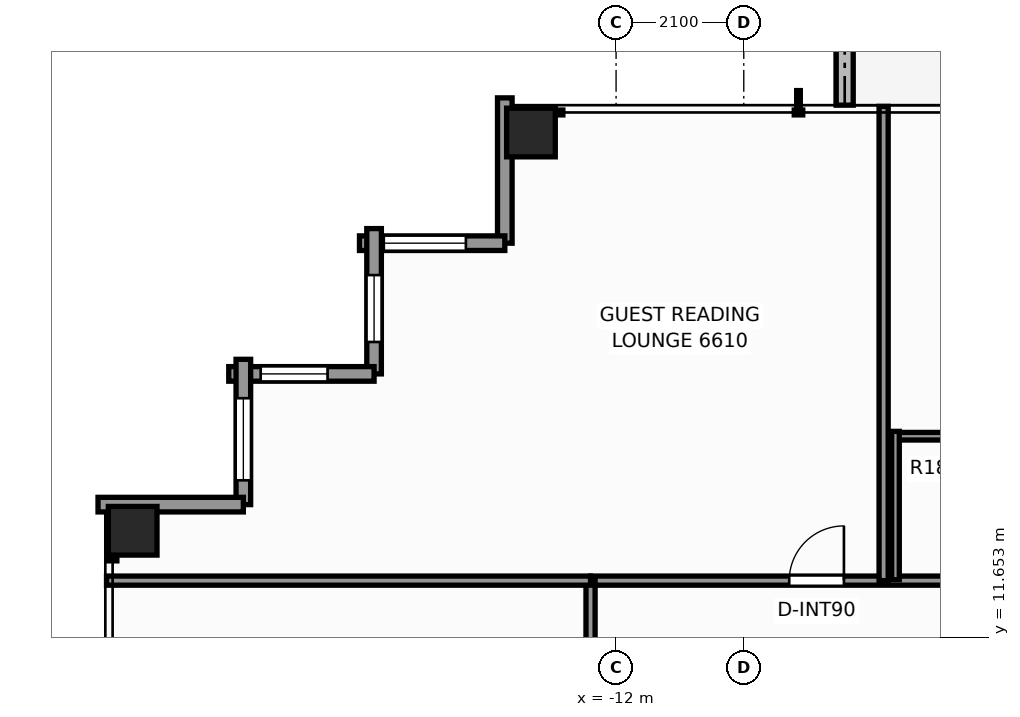
"""IFC4 building model, lengths in metres.
Left out: names, types, materials, properties, quantities, classifications, styles, units other than length and angle.
Written with IfcOpenShell. Run it as: python <this file> out.ifc"""

import sys

from ifc_helpers import new_model, si_unit, direction, frame, frame_2d, origin, origin_2d, place, context, subcontext, project, spatial, rectangle, extrude, element, fill, save


model = new_model("IFC4")
c1 = context("Model", 3, precision=1e-05, world=origin(), true_north=direction((0.0, 1.0)))
c2 = subcontext(c1, "Body", "Model", "MODEL_VIEW")
j1 = project(units=[si_unit("LENGTHUNIT", "METRE"), si_unit("PLANEANGLEUNIT", "RADIAN")], contexts=[c1])
p1 = place(None, origin())
s1 = spatial("IfcSite", under=j1, at=p1, CompositionType="ELEMENT")
p2 = place(p1, origin())
s2 = spatial("IfcBuilding", under=s1, at=p2, CompositionType="ELEMENT")
p3 = place(p2, frame((0.0, 0.0, 226.2)))
s3 = spatial("IfcBuildingStorey", under=s2, at=p3, CompositionType="ELEMENT", Elevation=226.2)
for number, where, z_axis, x_axis in (
    (1, (-13.4, 19.95, 0.0), (0.0, 0.0, 1.0), (1.0, 0.0, 0.0)),
    (2, (-19.95, 13.4, 0.0), (0.0, 0.0, 1.0), (1.0, 0.0, 0.0)),
):
    element("IfcColumn", number, at=place(p3, frame(where, z_axis=z_axis, x_axis=x_axis)), inside=s3, PredefinedType="COLUMN", context=c2, shape_type="SweptSolid", body=[
        extrude(rectangle(XDim=0.8, YDim=0.8, at=origin_2d()), origin(), (0.0, 0.0, 1.0), 3.3),
    ])
p4 = place(p3, frame((-8.24, 23.767, -0.04), z_axis=(0.0, 0.0, 1.0), x_axis=(0.0, -1.0, 0.0)))
e3 = element("IfcWall", 3, at=p4, inside=s3, PredefinedType="PARAPET", context=c2, shape_type="SweptSolid", body=[
    extrude(rectangle(XDim=3.367, YDim=0.28, at=frame_2d((1.684, 0.0))), origin(), (0.0, 0.0, 1.0), 0.42),
])
p5 = place(p3, frame((-13.83, 18.13, 0.0), z_axis=(0.0, 0.0, 1.0), x_axis=(0.0, 1.0, 0.0)))
e4 = element("IfcWall", 4, at=p5, inside=s3, PredefinedType="STANDARD", context=c2, shape_type="SweptSolid", body=[
    extrude(rectangle(XDim=2.39, YDim=0.24, at=frame_2d((1.195, 0.0))), origin(), (0.0, 0.0, 1.0), 2.463),
])
p6 = place(p3, frame((-16.22, 18.13, 0.0), z_axis=(0.0, 0.0, 1.0), x_axis=(1.0, 0.0, 0.0)))
e5 = element("IfcWall", 5, at=p6, inside=s3, PredefinedType="STANDARD", context=c2, shape_type="SweptSolid", body=[
    extrude(rectangle(XDim=2.39, YDim=0.24, at=frame_2d((1.195, 0.0))), origin(), (0.0, 0.0, 1.0), 2.463),
])
p7 = place(p6, frame((0.4, 0.0, 0.65)))
e6 = element("IfcOpeningElement", 6, at=p7, cuts=e5, PredefinedType="OPENING", context=c2, shape_type="SweptSolid", body=[
    extrude(rectangle(XDim=1.35, YDim=1.55, at=frame_2d((0.675, 0.775))), frame((0.0, 0.13, 0.0), z_axis=(0.0, -1.0, 0.0), x_axis=(1.0, 0.0, 0.0)), (0.0, 0.0, 1.0), 0.26),
])
p8 = place(p3, frame((-15.98, 15.98, 0.0), z_axis=(0.0, 0.0, 1.0), x_axis=(0.0, 1.0, 0.0)))
e7 = element("IfcWall", 7, at=p8, inside=s3, PredefinedType="STANDARD", context=c2, shape_type="SweptSolid", body=[
    extrude(rectangle(XDim=2.39, YDim=0.24, at=frame_2d((1.195, 0.0))), origin(), (0.0, 0.0, 1.0), 2.463),
])
p9 = place(p8, frame((0.525, 0.0, 0.65)))
e8 = element("IfcOpeningElement", 8, at=p9, cuts=e7, PredefinedType="OPENING", context=c2, shape_type="SweptSolid", body=[
    extrude(rectangle(XDim=1.1, YDim=1.45, at=frame_2d((0.55, 0.725))), frame((0.0, 0.13, 0.0), z_axis=(0.0, -1.0, 0.0), x_axis=(1.0, 0.0, 0.0)), (0.0, 0.0, 1.0), 0.26),
])
p10 = place(p3, frame((-18.37, 15.98, 0.0), z_axis=(0.0, 0.0, 1.0), x_axis=(1.0, 0.0, 0.0)))
e9 = element("IfcWall", 9, at=p10, inside=s3, PredefinedType="STANDARD", context=c2, shape_type="SweptSolid", body=[
    extrude(rectangle(XDim=2.39, YDim=0.24, at=frame_2d((1.195, 0.0))), origin(), (0.0, 0.0, 1.0), 2.463),
])
p11 = place(p10, frame((0.525, 0.0, 0.65)))
e10 = element("IfcOpeningElement", 10, at=p11, cuts=e9, PredefinedType="OPENING", context=c2, shape_type="SweptSolid", body=[
    extrude(rectangle(XDim=1.1, YDim=1.45, at=frame_2d((0.55, 0.725))), frame((0.0, 0.13, 0.0), z_axis=(0.0, -1.0, 0.0), x_axis=(1.0, 0.0, 0.0)), (0.0, 0.0, 1.0), 0.26),
])
p12 = place(p3, frame((-18.13, 13.83, 0.0), z_axis=(0.0, 0.0, 1.0), x_axis=(0.0, 1.0, 0.0)))
e11 = element("IfcWall", 11, at=p12, inside=s3, PredefinedType="STANDARD", context=c2, shape_type="SweptSolid", body=[
    extrude(rectangle(XDim=2.39, YDim=0.24, at=frame_2d((1.195, 0.0))), origin(), (0.0, 0.0, 1.0), 2.463),
])
p13 = place(p12, frame((0.4, 0.0, 0.65)))
e12 = element("IfcOpeningElement", 12, at=p13, cuts=e11, PredefinedType="OPENING", context=c2, shape_type="SweptSolid", body=[
    extrude(rectangle(XDim=1.35, YDim=1.55, at=frame_2d((0.675, 0.775))), frame((0.0, 0.13, 0.0), z_axis=(0.0, -1.0, 0.0), x_axis=(1.0, 0.0, 0.0)), (0.0, 0.0, 1.0), 0.26),
])
p14 = place(p3, frame((-20.52, 13.83, 0.0), z_axis=(0.0, 0.0, 1.0), x_axis=(1.0, 0.0, 0.0)))
e13 = element("IfcWall", 13, at=p14, inside=s3, PredefinedType="STANDARD", context=c2, shape_type="SweptSolid", body=[
    extrude(rectangle(XDim=2.39, YDim=0.24, at=frame_2d((1.195, 0.0))), origin(), (0.0, 0.0, 1.0), 2.463),
])
p15 = place(p3, frame((-12.42, 12.58, 0.0), z_axis=(0.0, 0.0, 1.0), x_axis=(1.0, 0.0, 0.0)))
e14 = element("IfcWall", 14, at=p15, inside=s3, PredefinedType="PARTITIONING", context=c2, shape_type="SweptSolid", body=[
    extrude(rectangle(XDim=24.68, YDim=0.15, at=frame_2d((12.34, 0.0))), origin(), (0.0, 0.0, 1.0), 2.369),
])
p16 = place(p15, frame((3.267, 0.0, 0.0)))
e15 = element("IfcOpeningElement", 15, at=p16, cuts=e14, PredefinedType="OPENING", context=c2, shape_type="SweptSolid", body=[
    extrude(rectangle(XDim=0.9, YDim=2.06, at=frame_2d((0.45, 1.03))), frame((0.0, 0.085, 0.0), z_axis=(0.0, -1.0, 0.0), x_axis=(1.0, 0.0, 0.0)), (0.0, 0.0, 1.0), 0.17),
])
p17 = place(p15, frame((9.915, 0.0, 0.0)))
e16 = element("IfcOpeningElement", 16, at=p17, cuts=e14, PredefinedType="OPENING", context=c2, shape_type="SweptSolid", body=[
    extrude(rectangle(XDim=0.95, YDim=2.06, at=frame_2d((0.475, 1.03))), frame((0.0, 0.085, 0.0), z_axis=(0.0, -1.0, 0.0), x_axis=(1.0, 0.0, 0.0)), (0.0, 0.0, 1.0), 0.17),
])
p18 = place(p15, frame((18.587, 0.0, 0.0)))
e17 = element("IfcOpeningElement", 17, at=p18, cuts=e14, PredefinedType="OPENING", context=c2, shape_type="SweptSolid", body=[
    extrude(rectangle(XDim=0.95, YDim=2.06, at=frame_2d((0.475, 1.03))), frame((0.0, 0.085, 0.0), z_axis=(0.0, -1.0, 0.0), x_axis=(1.0, 0.0, 0.0)), (0.0, 0.0, 1.0), 0.17),
])
p19 = place(p15, frame((20.85, 0.0, 0.0)))
e18 = element("IfcOpeningElement", 18, at=p19, cuts=e14, PredefinedType="OPENING", context=c2, shape_type="SweptSolid", body=[
    extrude(rectangle(XDim=0.9, YDim=2.06, at=frame_2d((0.45, 1.03))), frame((0.0, 0.085, 0.0), z_axis=(0.0, -1.0, 0.0), x_axis=(1.0, 0.0, 0.0)), (0.0, 0.0, 1.0), 0.17),
])
p20 = place(p3, frame((-12.42, -12.26, 0.0), z_axis=(0.0, 0.0, 1.0), x_axis=(0.0, 1.0, 0.0)))
e19 = element("IfcWall", 19, at=p20, inside=s3, PredefinedType="PARTITIONING", context=c2, shape_type="SweptSolid", body=[
    extrude(rectangle(XDim=24.84, YDim=0.15, at=frame_2d((12.42, 0.0))), origin(), (0.0, 0.0, 1.0), 2.369),
])
p21 = place(p20, frame((3.84, 0.0, 0.0)))
e20 = element("IfcOpeningElement", 20, at=p21, cuts=e19, PredefinedType="OPENING", context=c2, shape_type="SweptSolid", body=[
    extrude(rectangle(XDim=0.95, YDim=2.06, at=frame_2d((0.475, 1.03))), frame((0.0, 0.085, 0.0), z_axis=(0.0, -1.0, 0.0), x_axis=(1.0, 0.0, 0.0)), (0.0, 0.0, 1.0), 0.17),
])
p22 = place(p20, frame((9.738, 0.0, 0.0)))
e21 = element("IfcOpeningElement", 21, at=p22, cuts=e19, PredefinedType="OPENING", context=c2, shape_type="SweptSolid", body=[
    extrude(rectangle(XDim=0.95, YDim=2.06, at=frame_2d((0.475, 1.03))), frame((0.0, 0.085, 0.0), z_axis=(0.0, -1.0, 0.0), x_axis=(1.0, 0.0, 0.0)), (0.0, 0.0, 1.0), 0.17),
])
p23 = place(p20, frame((19.32, 0.0, 0.0)))
e22 = element("IfcOpeningElement", 22, at=p23, cuts=e19, PredefinedType="OPENING", context=c2, shape_type="SweptSolid", body=[
    extrude(rectangle(XDim=0.95, YDim=2.06, at=frame_2d((0.475, 1.03))), frame((0.0, 0.085, 0.0), z_axis=(0.0, -1.0, 0.0), x_axis=(1.0, 0.0, 0.0)), (0.0, 0.0, 1.0), 0.17),
])
p24 = place(p3, frame((-20.38, 12.58, 0.0), z_axis=(0.0, 0.0, 1.0), x_axis=(1.0, 0.0, 0.0)))
e23 = element("IfcWall", 23, at=p24, inside=s3, PredefinedType="PARTITIONING", context=c2, shape_type="SweptSolid", body=[
    extrude(rectangle(XDim=7.96, YDim=0.15, at=frame_2d((3.98, 0.0))), origin(), (0.0, 0.0, 1.0), 2.369),
])
p25 = place(p3, frame((-7.6, 12.58, 0.0), z_axis=(0.0, 0.0, 1.0), x_axis=(0.0, 1.0, 0.0)))
e24 = element("IfcWall", 24, at=p25, inside=s3, PredefinedType="PARTITIONING", context=c2, shape_type="SweptSolid", body=[
    extrude(rectangle(XDim=7.8, YDim=0.15, at=frame_2d((3.9, 0.0))), origin(), (0.0, 0.0, 1.0), 2.453),
])
p26 = place(p3, frame((-7.465, 14.955, 0.0), z_axis=(0.0, 0.0, 1.0), x_axis=(1.0, 0.0, 0.0)))
e25 = element("IfcWall", 25, at=p26, inside=s3, PredefinedType="PARTITIONING", context=c2, shape_type="SweptSolid", body=[
    extrude(rectangle(XDim=2.27, YDim=0.125, at=frame_2d((1.135, 0.0))), origin(), (0.0, 0.0, 1.0), 3.08),
])
p27 = place(p3, frame((-7.405, 12.595, 0.0), z_axis=(0.0, 0.0, 1.0), x_axis=(0.0, 1.0, 0.0)))
e26 = element("IfcWall", 26, at=p27, inside=s3, PredefinedType="PARTITIONING", context=c2, shape_type="SweptSolid", body=[
    extrude(rectangle(XDim=2.44, YDim=0.125, at=frame_2d((1.22, 0.0))), origin(), (0.0, 0.0, 1.0), 3.08),
])
p28 = place(p7, origin())
e27 = element("IfcWindow", 27, at=p28, inside=s3, PartitioningType="SINGLE_PANEL", PredefinedType="WINDOW", context=c2, shape_type="SweptSolid", body=[
    extrude(rectangle(XDim=1.35, YDim=1.55, at=frame_2d((0.675, 0.775))), frame((0.0, 0.03, 0.0), z_axis=(0.0, -1.0, 0.0), x_axis=(1.0, 0.0, 0.0)), (0.0, 0.0, 1.0), 0.06),
])
fill(e6, e27)
p29 = place(p9, origin())
e28 = element("IfcWindow", 28, at=p29, inside=s3, PartitioningType="SINGLE_PANEL", PredefinedType="WINDOW", context=c2, shape_type="SweptSolid", body=[
    extrude(rectangle(XDim=1.1, YDim=1.45, at=frame_2d((0.55, 0.725))), frame((0.0, 0.03, 0.0), z_axis=(0.0, -1.0, 0.0), x_axis=(1.0, 0.0, 0.0)), (0.0, 0.0, 1.0), 0.06),
])
fill(e8, e28)
p30 = place(p11, origin())
e29 = element("IfcWindow", 29, at=p30, inside=s3, PartitioningType="SINGLE_PANEL", PredefinedType="WINDOW", context=c2, shape_type="SweptSolid", body=[
    extrude(rectangle(XDim=1.1, YDim=1.45, at=frame_2d((0.55, 0.725))), frame((0.0, 0.03, 0.0), z_axis=(0.0, -1.0, 0.0), x_axis=(1.0, 0.0, 0.0)), (0.0, 0.0, 1.0), 0.06),
])
fill(e10, e29)
p31 = place(p13, origin())
e30 = element("IfcWindow", 30, at=p31, inside=s3, PartitioningType="SINGLE_PANEL", PredefinedType="WINDOW", context=c2, shape_type="SweptSolid", body=[
    extrude(rectangle(XDim=1.35, YDim=1.55, at=frame_2d((0.675, 0.775))), frame((0.0, 0.03, 0.0), z_axis=(0.0, -1.0, 0.0), x_axis=(1.0, 0.0, 0.0)), (0.0, 0.0, 1.0), 0.06),
])
fill(e12, e30)
p32 = place(p16, origin())
e31 = element("IfcDoor", 31, at=p32, inside=s3, OperationType="SINGLE_SWING_RIGHT", PredefinedType="DOOR", context=c2, shape_type="SweptSolid", body=[
    extrude(rectangle(XDim=0.9, YDim=2.06, at=frame_2d((0.45, 1.03))), frame((0.0, 0.025, 0.0), z_axis=(0.0, -1.0, 0.0), x_axis=(1.0, 0.0, 0.0)), (0.0, 0.0, 1.0), 0.05),
])
fill(e15, e31)
save(model, sys.argv[1])
